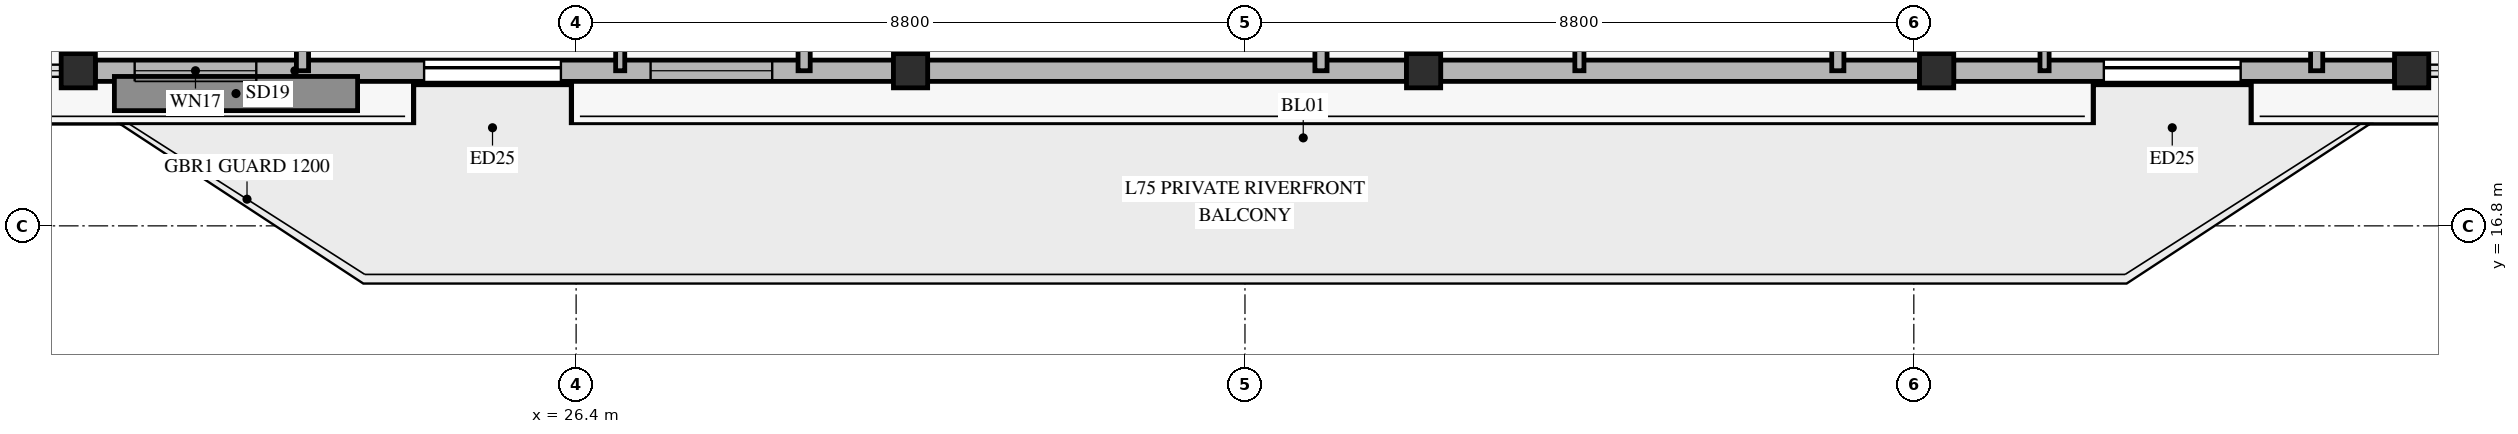
"""IFC4 building model, lengths in metres.
Left out: names, types, materials, properties, quantities, classifications, styles, units other than length and angle.
Written with IfcOpenShell. Run it as: python <this file> out.ifc"""

import sys

from ifc_helpers import new_model, si_unit, direction, frame, frame_2d, origin, origin_2d, place, context, subcontext, project, spatial, rectangle, hollow_rectangle, extrude, source, transform, mapped, element, fill, save


model = new_model("IFC4")
c1 = context("Model", 3, precision=1e-05, world=origin(), true_north=direction((0.0, 1.0)))
c2 = subcontext(c1, "Body", "Model", "MODEL_VIEW")
j1 = project(units=[si_unit("LENGTHUNIT", "METRE"), si_unit("PLANEANGLEUNIT", "RADIAN")], contexts=[c1])
p1 = place(None, origin())
s1 = spatial("IfcSite", under=j1, at=p1, CompositionType="ELEMENT")
p2 = place(p1, origin())
s2 = spatial("IfcBuilding", under=s1, at=p2, CompositionType="ELEMENT")
p3 = place(p2, frame((0.0, 0.0, 293.8)))
s3 = spatial("IfcBuildingStorey", under=s2, at=p3, CompositionType="ELEMENT", Elevation=293.8)
m1 = source(origin(), c2, "Body", "SweptSolid", [
    extrude(hollow_rectangle(XDim=0.45, YDim=0.45, WallThickness=0.022, at=origin_2d()), origin(), (0.0, 0.0, 1.0), 3.185),
])
for number, where, z_axis, x_axis in (
    (1, (19.85, 18.841, 0.0), (0.0, 0.0, 1.0), (1.0, 0.0, 0.0)),
    (2, (30.8, 18.841, 0.0), (0.0, 0.0, 1.0), (1.0, 0.0, 0.0)),
    (3, (37.55, 18.841, 0.0), (0.0, 0.0, 1.0), (1.0, 0.0, 0.0)),
    (4, (44.3, 18.841, 0.0), (0.0, 0.0, 1.0), (1.0, 0.0, 0.0)),
    (5, (50.55, 18.841, 0.0), (0.0, 0.0, 1.0), (1.0, 0.0, 0.0)),
):
    element("IfcColumn", number, at=place(p3, frame(where, z_axis=z_axis, x_axis=x_axis)), inside=s3, PredefinedType="COLUMN", context=c2, shape_type="MappedRepresentation", body=[
        mapped(m1, transform((0.0, 0.0, 0.0), x_axis=(1.0, 0.0, 0.0), y_axis=(0.0, 1.0, 0.0), z_axis=(0.0, 0.0, 1.0), scale=1.0)),
    ])
p4 = place(p3, frame((20.075, 18.841, 0.0), z_axis=(0.0, 0.0, 1.0), x_axis=(1.0, 0.0, 0.0)))
e6 = element("IfcWall", 6, at=p4, inside=s3, PredefinedType="SOLIDWALL", context=c2, shape_type="SweptSolid", body=[
    extrude(rectangle(XDim=10.5, YDim=0.28, at=frame_2d((5.25, 0.0))), origin(), (0.0, 0.0, 1.0), 2.815),
])
p5 = place(p4, frame((4.325, 0.0, 0.0)))
e7 = element("IfcOpeningElement", 7, at=p5, cuts=e6, PredefinedType="OPENING", context=c2, shape_type="SweptSolid", body=[
    extrude(rectangle(XDim=1.8, YDim=2.25, at=frame_2d((0.9, 1.125))), frame((0.0, 0.15, 0.0), z_axis=(0.0, -1.0, 0.0), x_axis=(1.0, 0.0, 0.0)), (0.0, 0.0, 1.0), 0.3),
])
p6 = place(p4, frame((0.517, 0.0, 0.45)))
e8 = element("IfcOpeningElement", 8, at=p6, cuts=e6, PredefinedType="OPENING", context=c2, shape_type="SweptSolid", body=[
    extrude(rectangle(XDim=1.6, YDim=2.0, at=frame_2d((0.8, 1.0))), frame((0.0, 0.15, 0.0), z_axis=(0.0, -1.0, 0.0), x_axis=(1.0, 0.0, 0.0)), (0.0, 0.0, 1.0), 0.3),
])
p7 = place(p4, frame((7.305, 0.0, 0.45)))
e9 = element("IfcOpeningElement", 9, at=p7, cuts=e6, PredefinedType="OPENING", context=c2, shape_type="SweptSolid", body=[
    extrude(rectangle(XDim=1.6, YDim=2.0, at=frame_2d((0.8, 1.0))), frame((0.0, 0.15, 0.0), z_axis=(0.0, -1.0, 0.0), x_axis=(1.0, 0.0, 0.0)), (0.0, 0.0, 1.0), 0.3),
])
for number, where, z_axis, x_axis in (
    (10, (31.025, 18.841, 0.0), (0.0, 0.0, 1.0), (1.0, 0.0, 0.0)),
    (11, (37.775, 18.841, 0.0), (0.0, 0.0, 1.0), (1.0, 0.0, 0.0)),
):
    element("IfcWall", number, at=place(p3, frame(where, z_axis=z_axis, x_axis=x_axis)), inside=s3, PredefinedType="SOLIDWALL", context=c2, shape_type="SweptSolid", body=[
        extrude(rectangle(XDim=6.3, YDim=0.28, at=frame_2d((3.15, 0.0))), origin(), (0.0, 0.0, 1.0), 2.815),
    ])
p8 = place(p3, frame((44.525, 18.841, 0.0), z_axis=(0.0, 0.0, 1.0), x_axis=(1.0, 0.0, 0.0)))
e12 = element("IfcWall", 12, at=p8, inside=s3, PredefinedType="SOLIDWALL", context=c2, shape_type="SweptSolid", body=[
    extrude(rectangle(XDim=5.8, YDim=0.28, at=frame_2d((2.9, 0.0))), origin(), (0.0, 0.0, 1.0), 2.815),
])
p9 = place(p8, frame((1.975, 0.0, 0.0)))
e13 = element("IfcOpeningElement", 13, at=p9, cuts=e12, PredefinedType="OPENING", context=c2, shape_type="SweptSolid", body=[
    extrude(rectangle(XDim=1.8, YDim=2.25, at=frame_2d((0.9, 1.125))), frame((0.0, 0.15, 0.0), z_axis=(0.0, -1.0, 0.0), x_axis=(1.0, 0.0, 0.0)), (0.0, 0.0, 1.0), 0.3),
])
for number, where, z_axis, x_axis in (
    (14, (22.8, 18.841, 0.0), (0.0, 0.0, 1.0), (0.0, 1.0, 0.0)),
    (15, (29.4, 18.841, 0.0), (0.0, 0.0, 1.0), (0.0, 1.0, 0.0)),
    (16, (36.2, 18.841, 0.0), (0.0, 0.0, 1.0), (0.0, 1.0, 0.0)),
    (17, (43.0, 18.841, 0.0), (0.0, 0.0, 1.0), (0.0, 1.0, 0.0)),
    (18, (49.3, 18.841, 0.0), (0.0, 0.0, 1.0), (0.0, 1.0, 0.0)),
):
    element("IfcWall", number, at=place(p3, frame(where, z_axis=z_axis, x_axis=x_axis)), inside=s3, PredefinedType="PARTITIONING", context=c2, shape_type="SweptSolid", body=[
        extrude(rectangle(XDim=15.509, YDim=0.16, at=frame_2d((7.754, 0.0))), origin(), (0.0, 0.0, 1.0), 2.77),
    ])
p10 = place(p3, frame((26.98, 18.841, 0.0), z_axis=(0.0, 0.0, 1.0), x_axis=(0.0, 1.0, 0.0)))
e19 = element("IfcWall", 19, at=p10, inside=s3, PredefinedType="PARTITIONING", context=c2, shape_type="SweptSolid", body=[
    extrude(rectangle(XDim=12.859, YDim=0.12, at=frame_2d((6.429, 0.0))), origin(), (0.0, 0.0, 1.0), 2.77),
])
p11 = place(p10, frame((0.8, 0.0, 0.0)))
e20 = element("IfcOpeningElement", 20, at=p11, cuts=e19, PredefinedType="OPENING", context=c2, shape_type="SweptSolid", body=[
    extrude(rectangle(XDim=0.95, YDim=2.1, at=frame_2d((0.475, 1.05))), frame((0.0, 0.07, 0.0), z_axis=(0.0, -1.0, 0.0), x_axis=(1.0, 0.0, 0.0)), (0.0, 0.0, 1.0), 0.14),
])
p12 = place(p3, frame((39.6, 18.841, 0.0), z_axis=(0.0, 0.0, 1.0), x_axis=(0.0, 1.0, 0.0)))
e21 = element("IfcWall", 21, at=p12, inside=s3, PredefinedType="PARTITIONING", context=c2, shape_type="SweptSolid", body=[
    extrude(rectangle(XDim=12.859, YDim=0.12, at=frame_2d((6.429, 0.0))), origin(), (0.0, 0.0, 1.0), 2.77),
])
p13 = place(p12, frame((1.59, 0.0, 0.0)))
e22 = element("IfcOpeningElement", 22, at=p13, cuts=e21, PredefinedType="OPENING", context=c2, shape_type="SweptSolid", body=[
    extrude(rectangle(XDim=0.95, YDim=2.1, at=frame_2d((0.475, 1.05))), frame((0.0, 0.07, 0.0), z_axis=(0.0, -1.0, 0.0), x_axis=(1.0, 0.0, 0.0)), (0.0, 0.0, 1.0), 0.14),
])
p14 = place(p12, frame((9.299, 0.0, 0.0)))
e23 = element("IfcOpeningElement", 23, at=p14, cuts=e21, PredefinedType="OPENING", context=c2, shape_type="SweptSolid", body=[
    extrude(rectangle(XDim=0.95, YDim=2.1, at=frame_2d((0.475, 1.05))), frame((0.0, 0.07, 0.0), z_axis=(0.0, -1.0, 0.0), x_axis=(1.0, 0.0, 0.0)), (0.0, 0.0, 1.0), 0.14),
])
p15 = place(p3, frame((45.72, 18.841, 0.0), z_axis=(0.0, 0.0, 1.0), x_axis=(0.0, 1.0, 0.0)))
e24 = element("IfcWall", 24, at=p15, inside=s3, PredefinedType="PARTITIONING", context=c2, shape_type="SweptSolid", body=[
    extrude(rectangle(XDim=12.859, YDim=0.12, at=frame_2d((6.429, 0.0))), origin(), (0.0, 0.0, 1.0), 2.77),
])
p16 = place(p15, frame((0.67, 0.0, 0.0)))
e25 = element("IfcOpeningElement", 25, at=p16, cuts=e24, PredefinedType="OPENING", context=c2, shape_type="SweptSolid", body=[
    extrude(rectangle(XDim=0.95, YDim=2.1, at=frame_2d((0.475, 1.05))), frame((0.0, 0.07, 0.0), z_axis=(0.0, -1.0, 0.0), x_axis=(1.0, 0.0, 0.0)), (0.0, 0.0, 1.0), 0.14),
])
p17 = place(p15, frame((9.299, 0.0, 0.0)))
e26 = element("IfcOpeningElement", 26, at=p17, cuts=e24, PredefinedType="OPENING", context=c2, shape_type="SweptSolid", body=[
    extrude(rectangle(XDim=0.95, YDim=2.1, at=frame_2d((0.475, 1.05))), frame((0.0, 0.07, 0.0), z_axis=(0.0, -1.0, 0.0), x_axis=(1.0, 0.0, 0.0)), (0.0, 0.0, 1.0), 0.14),
])
m2 = source(origin(), c2, "Body", "SweptSolid", [
    extrude(rectangle(XDim=1.8, YDim=2.25, at=frame_2d((0.9, 1.125))), frame((0.0, 0.025, 0.0), z_axis=(0.0, -1.0, 0.0), x_axis=(1.0, 0.0, 0.0)), (0.0, 0.0, 1.0), 0.05),
])
p18 = place(p5, origin())
e27 = element("IfcDoor", 27, at=p18, inside=s3, OperationType="SLIDING_TO_LEFT", PredefinedType="DOOR", context=c2, shape_type="MappedRepresentation", body=[
    mapped(m2, transform((0.0, 0.0, 0.0), x_axis=(1.0, 0.0, 0.0), y_axis=(0.0, 1.0, 0.0), z_axis=(0.0, 0.0, 1.0), scale=1.0)),
])
fill(e7, e27)
m3 = source(origin(), c2, "Body", "SweptSolid", [
    extrude(rectangle(XDim=1.6, YDim=2.0, at=frame_2d((0.8, 1.0))), frame((0.0, 0.03, 0.0), z_axis=(0.0, -1.0, 0.0), x_axis=(1.0, 0.0, 0.0)), (0.0, 0.0, 1.0), 0.06),
])
p19 = place(p6, origin())
e28 = element("IfcWindow", 28, at=p19, inside=s3, PartitioningType="SINGLE_PANEL", PredefinedType="WINDOW", context=c2, shape_type="MappedRepresentation", body=[
    mapped(m3, transform((0.0, 0.0, 0.0), x_axis=(1.0, 0.0, 0.0), y_axis=(0.0, 1.0, 0.0), z_axis=(0.0, 0.0, 1.0), scale=1.0)),
])
fill(e8, e28)
p20 = place(p7, origin())
e29 = element("IfcWindow", 29, at=p20, inside=s3, PartitioningType="SINGLE_PANEL", PredefinedType="WINDOW", context=c2, shape_type="MappedRepresentation", body=[
    mapped(m3, transform((0.0, 0.0, 0.0), x_axis=(1.0, 0.0, 0.0), y_axis=(0.0, 1.0, 0.0), z_axis=(0.0, 0.0, 1.0), scale=1.0)),
])
fill(e9, e29)
p21 = place(p9, origin())
e30 = element("IfcDoor", 30, at=p21, inside=s3, OperationType="SLIDING_TO_LEFT", PredefinedType="DOOR", context=c2, shape_type="MappedRepresentation", body=[
    mapped(m2, transform((0.0, 0.0, 0.0), x_axis=(1.0, 0.0, 0.0), y_axis=(0.0, 1.0, 0.0), z_axis=(0.0, 0.0, 1.0), scale=1.0)),
])
fill(e13, e30)
save(model, sys.argv[1])
